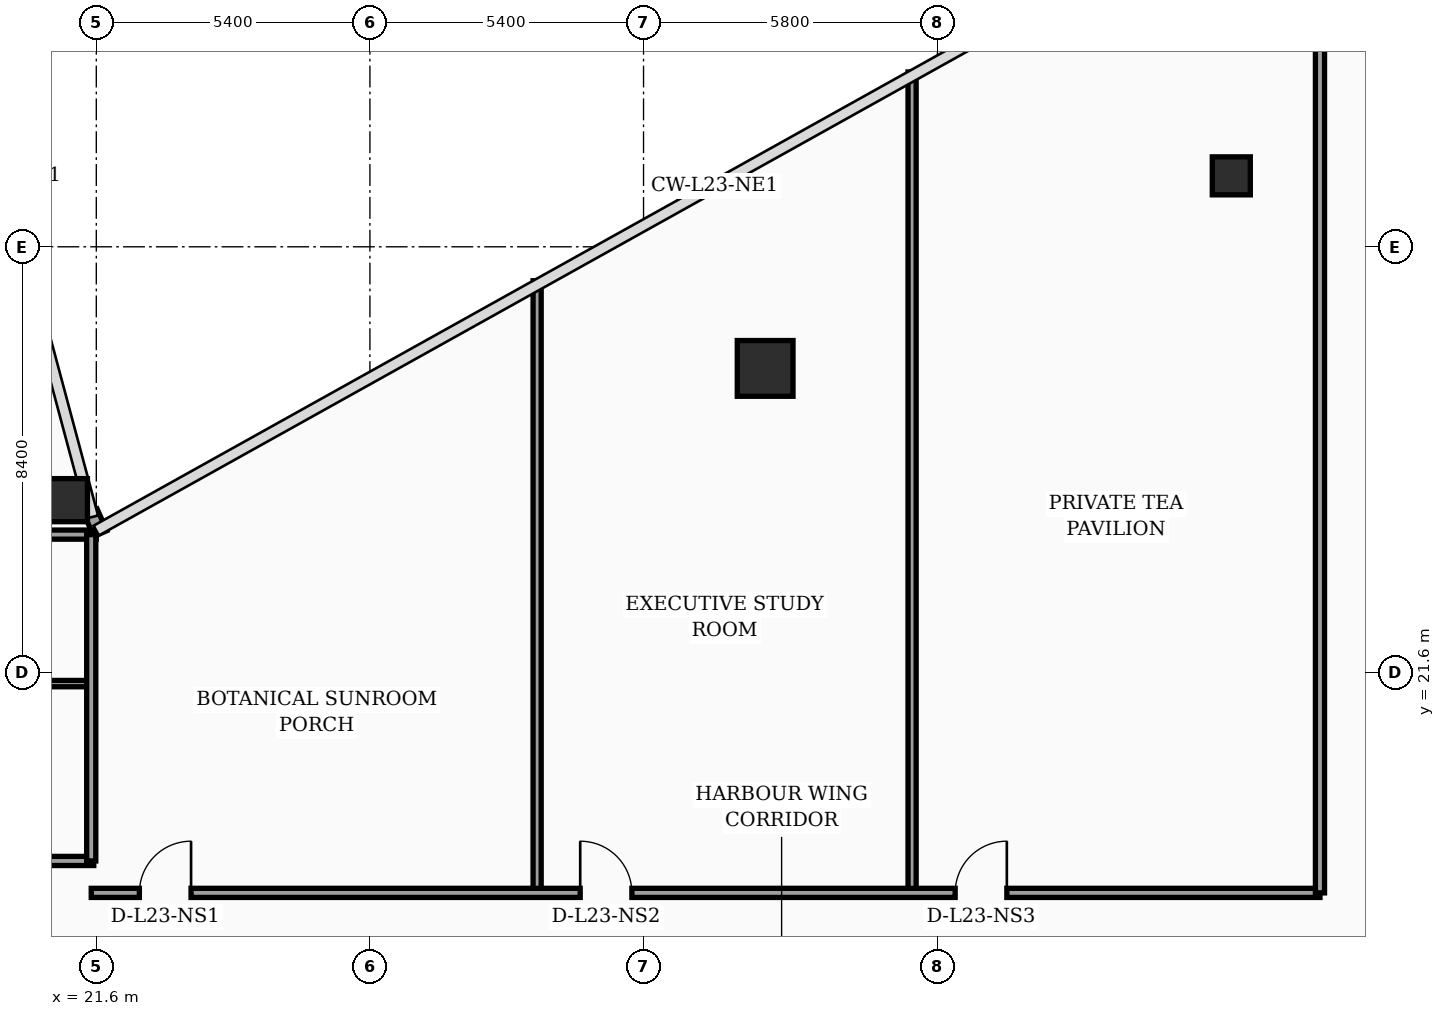
"""IFC4 building model, lengths in metres.
Left out: names, types, materials, properties, quantities, classifications, styles, units other than length and angle.
Written with IfcOpenShell. Run it as: python <this file> out.ifc"""

import sys

from ifc_helpers import new_model, si_unit, direction, frame, frame_2d, origin, origin_2d, place, context, subcontext, project, spatial, rectangle, hollow_rectangle, circle, extrude, element, fill, save


model = new_model("IFC4")
c1 = context("Model", 3, precision=1e-05, world=origin(), true_north=direction((0.0, 1.0)))
c2 = subcontext(c1, "Body", "Model", "MODEL_VIEW")
j1 = project(units=[si_unit("LENGTHUNIT", "METRE"), si_unit("PLANEANGLEUNIT", "RADIAN")], contexts=[c1])
p1 = place(None, origin())
s1 = spatial("IfcSite", under=j1, at=p1, CompositionType="ELEMENT")
p2 = place(p1, origin())
s2 = spatial("IfcBuilding", under=s1, at=p2, CompositionType="ELEMENT")
p3 = place(p2, frame((0.0, 0.0, 97.4)))
s3 = spatial("IfcBuildingStorey", under=s2, at=p3, CompositionType="ELEMENT", Elevation=97.4)
p4 = place(p3, frame((21.0, 25.0, 0.0), z_axis=(0.0, 0.0, 1.0), x_axis=(1.0, 0.0, 0.0)))
e1 = element("IfcColumn", 1, at=p4, inside=s3, PredefinedType="COLUMN", context=c2, shape_type="SweptSolid", body=[
    extrude(hollow_rectangle(XDim=0.85, YDim=0.85, WallThickness=0.036, at=origin_2d()), origin(), (0.0, 0.0, 1.0), 3.56),
])
p5 = place(p3, frame((34.8, 27.6, 0.0), z_axis=(0.0, 0.0, 1.0), x_axis=(1.0, 0.0, 0.0)))
e2 = element("IfcColumn", 2, at=p5, inside=s3, PredefinedType="COLUMN", context=c2, shape_type="SweptSolid", body=[
    extrude(circle(Radius=0.55, at=origin_2d()), origin(), (0.0, 0.0, 1.0), 3.56),
])
p6 = place(p3, frame((44.0, 31.4, 0.0), z_axis=(0.0, 0.0, 1.0), x_axis=(1.0, 0.0, 0.0)))
e3 = element("IfcColumn", 3, at=p6, inside=s3, PredefinedType="COLUMN", context=c2, shape_type="SweptSolid", body=[
    extrude(hollow_rectangle(XDim=0.75, YDim=0.75, WallThickness=0.032, at=origin_2d()), origin(), (0.0, 0.0, 1.0), 3.56),
])
p7 = place(p3, frame((21.68, 24.34, 0.0), z_axis=(0.0, 0.0, 1.0), x_axis=(-0.40758134973, 0.913168901875, 0.0)))
e4 = element("IfcWall", 4, at=p7, inside=s3, PredefinedType="SOLIDWALL", context=c2, shape_type="SweptSolid", body=[
    extrude(rectangle(XDim=0.471, YDim=0.28, at=frame_2d((0.235, 0.0))), origin(), (0.0, 0.0, 1.0), 3.56),
])
p8 = place(p3, frame((17.65, 17.88, 0.0), z_axis=(0.0, 0.0, 1.0), x_axis=(1.0, 0.0, 0.0)))
e5 = element("IfcWall", 5, at=p8, inside=s3, PredefinedType="PARTITIONING", context=c2, shape_type="SweptSolid", body=[
    extrude(rectangle(XDim=3.9, YDim=0.18, at=frame_2d((1.95, 0.0))), origin(), (0.0, 0.0, 1.0), 3.56),
])
p9 = place(p3, frame((17.65, 21.38, 0.0), z_axis=(0.0, 0.0, 1.0), x_axis=(1.0, 0.0, 0.0)))
e6 = element("IfcWall", 6, at=p9, inside=s3, PredefinedType="PARTITIONING", context=c2, shape_type="SweptSolid", body=[
    extrude(rectangle(XDim=3.9, YDim=0.125, at=frame_2d((1.95, 0.0))), origin(), (0.0, 0.0, 1.0), 3.56),
])
p10 = place(p3, frame((17.65, 24.32, 0.0), z_axis=(0.0, 0.0, 1.0), x_axis=(1.0, 0.0, 0.0)))
e7 = element("IfcWall", 7, at=p10, inside=s3, PredefinedType="PARTITIONING", context=c2, shape_type="SweptSolid", body=[
    extrude(rectangle(XDim=3.95, YDim=0.18, at=frame_2d((1.975, 0.0))), origin(), (0.0, 0.0, 1.0), 3.56),
])
p11 = place(p3, frame((21.5, 17.88, 0.0), z_axis=(0.0, 0.0, 1.0), x_axis=(0.0, 1.0, 0.0)))
e8 = element("IfcWall", 8, at=p11, inside=s3, PredefinedType="PARTITIONING", context=c2, shape_type="SweptSolid", body=[
    extrude(rectangle(XDim=6.44, YDim=0.18, at=frame_2d((3.22, 0.0))), origin(), (0.0, 0.0, 1.0), 3.56),
])
p12 = place(p3, frame((30.3, 17.25, 0.0), z_axis=(0.0, 0.0, 1.0), x_axis=(0.0, 1.0, 0.0)))
e9 = element("IfcWall", 9, at=p12, inside=s3, PredefinedType="PARTITIONING", context=c2, shape_type="SweptSolid", body=[
    extrude(rectangle(XDim=12.08, YDim=0.16, at=frame_2d((6.04, 0.0))), origin(), (0.0, 0.0, 1.0), 2.84),
])
p13 = place(p3, frame((37.7, 17.25, 0.0), z_axis=(0.0, 0.0, 1.0), x_axis=(0.0, 1.0, 0.0)))
e10 = element("IfcWall", 10, at=p13, inside=s3, PredefinedType="PARTITIONING", context=c2, shape_type="SweptSolid", body=[
    extrude(rectangle(XDim=16.2, YDim=0.16, at=frame_2d((8.1, 0.0))), origin(), (0.0, 0.0, 1.0), 2.84),
])
p14 = place(p3, frame((21.5, 17.25, 0.0), z_axis=(0.0, 0.0, 1.0), x_axis=(1.0, 0.0, 0.0)))
e11 = element("IfcWall", 11, at=p14, inside=s3, PredefinedType="PARTITIONING", context=c2, shape_type="SweptSolid", body=[
    extrude(rectangle(XDim=24.25, YDim=0.18, at=frame_2d((12.125, 0.0))), origin(), (0.0, 0.0, 1.0), 2.84),
])
p15 = place(p14, frame((0.95, 0.0, 0.0)))
e12 = element("IfcOpeningElement", 12, at=p15, cuts=e11, PredefinedType="OPENING", context=c2, shape_type="SweptSolid", body=[
    extrude(rectangle(XDim=1.02, YDim=2.2, at=frame_2d((0.51, 1.1))), frame((0.0, 0.1, 0.0), z_axis=(0.0, -1.0, 0.0), x_axis=(1.0, 0.0, 0.0)), (0.0, 0.0, 1.0), 0.2),
])
p16 = place(p14, frame((9.65, 0.0, 0.0)))
e13 = element("IfcOpeningElement", 13, at=p16, cuts=e11, PredefinedType="OPENING", context=c2, shape_type="SweptSolid", body=[
    extrude(rectangle(XDim=1.02, YDim=2.2, at=frame_2d((0.51, 1.1))), frame((0.0, 0.1, 0.0), z_axis=(0.0, -1.0, 0.0), x_axis=(1.0, 0.0, 0.0)), (0.0, 0.0, 1.0), 0.2),
])
p17 = place(p14, frame((17.05, 0.0, 0.0)))
e14 = element("IfcOpeningElement", 14, at=p17, cuts=e11, PredefinedType="OPENING", context=c2, shape_type="SweptSolid", body=[
    extrude(rectangle(XDim=1.02, YDim=2.2, at=frame_2d((0.51, 1.1))), frame((0.0, 0.1, 0.0), z_axis=(0.0, -1.0, 0.0), x_axis=(1.0, 0.0, 0.0)), (0.0, 0.0, 1.0), 0.2),
])
p18 = place(p3, frame((45.75, 17.25, 0.0), z_axis=(0.0, 0.0, 1.0), x_axis=(0.0, 1.0, 0.0)))
e15 = element("IfcWall", 15, at=p18, inside=s3, PredefinedType="PARTITIONING", context=c2, shape_type="SweptSolid", body=[
    extrude(rectangle(XDim=20.69, YDim=0.18, at=frame_2d((10.345, 0.0))), origin(), (0.0, 0.0, 1.0), 2.84),
])
p19 = place(p15, origin())
e16 = element("IfcDoor", 16, at=p19, inside=s3, OperationType="SINGLE_SWING_RIGHT", PredefinedType="DOOR", context=c2, shape_type="SweptSolid", body=[
    extrude(rectangle(XDim=1.02, YDim=2.2, at=frame_2d((0.51, 1.1))), frame((0.0, 0.025, 0.0), z_axis=(0.0, -1.0, 0.0), x_axis=(1.0, 0.0, 0.0)), (0.0, 0.0, 1.0), 0.05),
])
fill(e12, e16)
p20 = place(p16, origin())
e17 = element("IfcDoor", 17, at=p20, inside=s3, OperationType="SINGLE_SWING_LEFT", PredefinedType="DOOR", context=c2, shape_type="SweptSolid", body=[
    extrude(rectangle(XDim=1.02, YDim=2.2, at=frame_2d((0.51, 1.1))), frame((0.0, 0.025, 0.0), z_axis=(0.0, -1.0, 0.0), x_axis=(1.0, 0.0, 0.0)), (0.0, 0.0, 1.0), 0.05),
])
fill(e13, e17)
p21 = place(p17, origin())
e18 = element("IfcDoor", 18, at=p21, inside=s3, OperationType="SINGLE_SWING_RIGHT", PredefinedType="DOOR", context=c2, shape_type="SweptSolid", body=[
    extrude(rectangle(XDim=1.02, YDim=2.2, at=frame_2d((0.51, 1.1))), frame((0.0, 0.025, 0.0), z_axis=(0.0, -1.0, 0.0), x_axis=(1.0, 0.0, 0.0)), (0.0, 0.0, 1.0), 0.05),
])
fill(e14, e18)
save(model, sys.argv[1])
